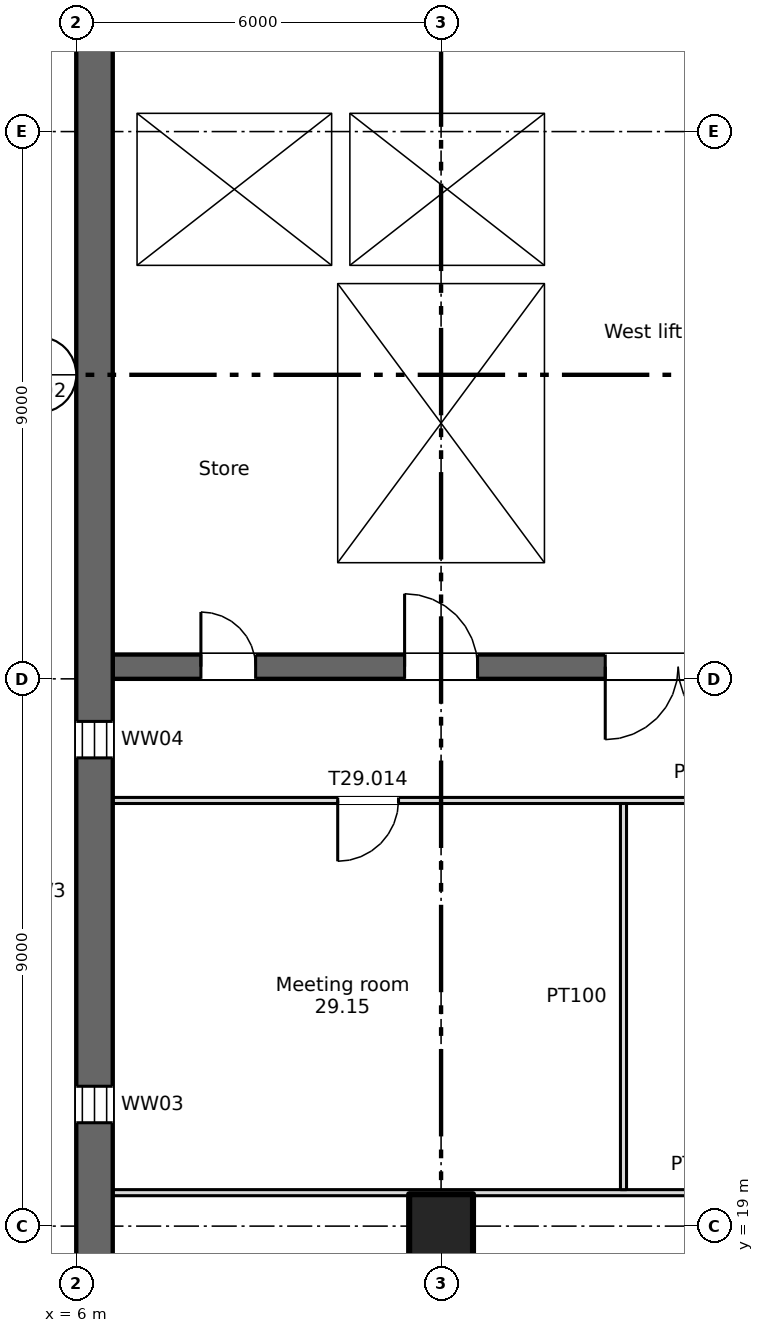
"""IFC4 building model, lengths in metres.
Left out: names, types, materials, properties, quantities, classifications, styles, units other than length and angle.
Written with IfcOpenShell. Run it as: python <this file> out.ifc"""

import sys

from ifc_helpers import new_model, si_unit, direction, frame, frame_2d, origin, origin_2d, place, context, subcontext, project, spatial, rectangle, extrude, element, fill, save


model = new_model("IFC4")
c1 = context("Model", 3, precision=1e-05, world=origin(), true_north=direction((0.0, 1.0)))
c2 = subcontext(c1, "Body", "Model", "MODEL_VIEW")
j1 = project(units=[si_unit("LENGTHUNIT", "METRE"), si_unit("PLANEANGLEUNIT", "RADIAN")], contexts=[c1])
p1 = place(None, origin())
s1 = spatial("IfcSite", under=j1, at=p1, CompositionType="ELEMENT")
p2 = place(p1, origin())
s2 = spatial("IfcBuilding", under=s1, at=p2, CompositionType="ELEMENT")
p3 = place(p2, frame((0.0, 0.0, 200.5)))
s3 = spatial("IfcBuildingStorey", under=s2, at=p3, CompositionType="ELEMENT", Elevation=200.5)
p4 = place(p3, frame((12.0, 19.0, 0.0), z_axis=(0.0, 0.0, 1.0), x_axis=(1.0, 0.0, 0.0)))
e1 = element("IfcColumn", 1, at=p4, inside=s3, PredefinedType="COLUMN", context=c2, shape_type="SweptSolid", body=[
    extrude(rectangle(XDim=1.05, YDim=1.05, at=origin_2d()), origin(), (0.0, 0.0, 1.0), 3.35),
])
p5 = place(p3, frame((6.3, 7.5, 0.0), z_axis=(0.0, 0.0, 1.0), x_axis=(0.0, 1.0, 0.0)))
e2 = element("IfcWall", 2, at=p5, inside=s3, PredefinedType="SHEAR", context=c2, shape_type="SweptSolid", body=[
    extrude(rectangle(XDim=34.0, YDim=0.6, at=frame_2d((17.0, 0.0))), origin(), (0.0, 0.0, 1.0), 3.35),
])
p6 = place(p5, frame((1.2, 0.0, 0.6)))
e3 = element("IfcOpeningElement", 3, at=p6, cuts=e2, PredefinedType="OPENING", context=c2, shape_type="SweptSolid", body=[
    extrude(rectangle(XDim=0.6, YDim=2.4, at=frame_2d((0.3, 1.2))), frame((0.0, 0.31, 0.0), z_axis=(0.0, -1.0, 0.0), x_axis=(1.0, 0.0, 0.0)), (0.0, 0.0, 1.0), 0.62),
])
p7 = place(p5, frame((7.2, 0.0, 0.6)))
e4 = element("IfcOpeningElement", 4, at=p7, cuts=e2, PredefinedType="OPENING", context=c2, shape_type="SweptSolid", body=[
    extrude(rectangle(XDim=0.6, YDim=2.4, at=frame_2d((0.3, 1.2))), frame((0.0, 0.31, 0.0), z_axis=(0.0, -1.0, 0.0), x_axis=(1.0, 0.0, 0.0)), (0.0, 0.0, 1.0), 0.62),
])
p8 = place(p5, frame((13.2, 0.0, 0.6)))
e5 = element("IfcOpeningElement", 5, at=p8, cuts=e2, PredefinedType="OPENING", context=c2, shape_type="SweptSolid", body=[
    extrude(rectangle(XDim=0.6, YDim=2.4, at=frame_2d((0.3, 1.2))), frame((0.0, 0.31, 0.0), z_axis=(0.0, -1.0, 0.0), x_axis=(1.0, 0.0, 0.0)), (0.0, 0.0, 1.0), 0.62),
])
p9 = place(p5, frame((19.2, 0.0, 0.6)))
e6 = element("IfcOpeningElement", 6, at=p9, cuts=e2, PredefinedType="OPENING", context=c2, shape_type="SweptSolid", body=[
    extrude(rectangle(XDim=0.6, YDim=2.4, at=frame_2d((0.3, 1.2))), frame((0.0, 0.31, 0.0), z_axis=(0.0, -1.0, 0.0), x_axis=(1.0, 0.0, 0.0)), (0.0, 0.0, 1.0), 0.62),
])
p10 = place(p3, frame((6.6, 28.2, 0.0), z_axis=(0.0, 0.0, 1.0), x_axis=(1.0, 0.0, 0.0)))
e7 = element("IfcWall", 7, at=p10, inside=s3, PredefinedType="SHEAR", context=c2, shape_type="SweptSolid", body=[
    extrude(rectangle(XDim=57.9, YDim=0.4, at=frame_2d((28.95, 0.0))), origin(), (0.0, 0.0, 1.0), 3.35),
])
p11 = place(p10, frame((13.95, 0.0, 0.0)))
e8 = element("IfcOpeningElement", 8, at=p11, cuts=e7, PredefinedType="OPENING", context=c2, shape_type="SweptSolid", body=[
    extrude(rectangle(XDim=0.9, YDim=2.1, at=frame_2d((0.45, 1.05))), frame((0.0, 0.21, 0.0), z_axis=(0.0, -1.0, 0.0), x_axis=(1.0, 0.0, 0.0)), (0.0, 0.0, 1.0), 0.42),
])
p12 = place(p10, frame((48.663, 0.0, 0.0)))
e9 = element("IfcOpeningElement", 9, at=p12, cuts=e7, PredefinedType="OPENING", context=c2, shape_type="SweptSolid", body=[
    extrude(rectangle(XDim=0.9, YDim=2.1, at=frame_2d((0.45, 1.05))), frame((0.0, 0.21, 0.0), z_axis=(0.0, -1.0, 0.0), x_axis=(1.0, 0.0, 0.0)), (0.0, 0.0, 1.0), 0.42),
])
p13 = place(p10, frame((51.238, 0.0, 0.0)))
e10 = element("IfcOpeningElement", 10, at=p13, cuts=e7, PredefinedType="OPENING", context=c2, shape_type="SweptSolid", body=[
    extrude(rectangle(XDim=0.9, YDim=2.1, at=frame_2d((0.45, 1.05))), frame((0.0, 0.21, 0.0), z_axis=(0.0, -1.0, 0.0), x_axis=(1.0, 0.0, 0.0)), (0.0, 0.0, 1.0), 0.42),
])
p14 = place(p10, frame((1.45, 0.0, 0.0)))
e11 = element("IfcOpeningElement", 11, at=p14, cuts=e7, PredefinedType="OPENING", context=c2, shape_type="SweptSolid", body=[
    extrude(rectangle(XDim=0.9, YDim=2.1, at=frame_2d((0.45, 1.05))), frame((0.0, 0.21, 0.0), z_axis=(0.0, -1.0, 0.0), x_axis=(1.0, 0.0, 0.0)), (0.0, 0.0, 1.0), 0.42),
])
p15 = place(p10, frame((4.8, 0.0, 0.0)))
e12 = element("IfcOpeningElement", 12, at=p15, cuts=e7, PredefinedType="OPENING", context=c2, shape_type="SweptSolid", body=[
    extrude(rectangle(XDim=1.2, YDim=2.1, at=frame_2d((0.6, 1.05))), frame((0.0, 0.21, 0.0), z_axis=(0.0, -1.0, 0.0), x_axis=(1.0, 0.0, 0.0)), (0.0, 0.0, 1.0), 0.42),
])
p16 = place(p10, frame((31.8, 0.0, 0.0)))
e13 = element("IfcOpeningElement", 13, at=p16, cuts=e7, PredefinedType="OPENING", context=c2, shape_type="SweptSolid", body=[
    extrude(rectangle(XDim=1.2, YDim=2.1, at=frame_2d((0.6, 1.05))), frame((0.0, 0.21, 0.0), z_axis=(0.0, -1.0, 0.0), x_axis=(1.0, 0.0, 0.0)), (0.0, 0.0, 1.0), 0.42),
])
p17 = place(p10, frame((55.3, 0.0, 0.0)))
e14 = element("IfcOpeningElement", 14, at=p17, cuts=e7, PredefinedType="OPENING", context=c2, shape_type="SweptSolid", body=[
    extrude(rectangle(XDim=1.2, YDim=2.1, at=frame_2d((0.6, 1.05))), frame((0.0, 0.21, 0.0), z_axis=(0.0, -1.0, 0.0), x_axis=(1.0, 0.0, 0.0)), (0.0, 0.0, 1.0), 0.42),
])
p18 = place(p10, frame((21.8, 0.0, 0.0)))
e15 = element("IfcOpeningElement", 15, at=p18, cuts=e7, PredefinedType="OPENING", context=c2, shape_type="SweptSolid", body=[
    extrude(rectangle(XDim=1.2, YDim=2.1, at=frame_2d((0.6, 1.05))), frame((0.0, 0.21, 0.0), z_axis=(0.0, -1.0, 0.0), x_axis=(1.0, 0.0, 0.0)), (0.0, 0.0, 1.0), 0.42),
])
p19 = place(p10, frame((41.8, 0.0, 0.0)))
e16 = element("IfcOpeningElement", 16, at=p19, cuts=e7, PredefinedType="OPENING", context=c2, shape_type="SweptSolid", body=[
    extrude(rectangle(XDim=1.2, YDim=2.1, at=frame_2d((0.6, 1.05))), frame((0.0, 0.21, 0.0), z_axis=(0.0, -1.0, 0.0), x_axis=(1.0, 0.0, 0.0)), (0.0, 0.0, 1.0), 0.42),
])
p20 = place(p10, frame((24.95, 0.0, 0.0)))
e17 = element("IfcOpeningElement", 17, at=p20, cuts=e7, PredefinedType="OPENING", context=c2, shape_type="SweptSolid", body=[
    extrude(rectangle(XDim=2.4, YDim=2.1, at=frame_2d((1.2, 1.05))), frame((0.0, 0.21, 0.0), z_axis=(0.0, -1.0, 0.0), x_axis=(1.0, 0.0, 0.0)), (0.0, 0.0, 1.0), 0.42),
])
p21 = place(p10, frame((37.45, 0.0, 0.0)))
e18 = element("IfcOpeningElement", 18, at=p21, cuts=e7, PredefinedType="OPENING", context=c2, shape_type="SweptSolid", body=[
    extrude(rectangle(XDim=2.4, YDim=2.1, at=frame_2d((1.2, 1.05))), frame((0.0, 0.21, 0.0), z_axis=(0.0, -1.0, 0.0), x_axis=(1.0, 0.0, 0.0)), (0.0, 0.0, 1.0), 0.42),
])
p22 = place(p10, frame((8.1, 0.0, 0.0)))
e19 = element("IfcOpeningElement", 19, at=p22, cuts=e7, PredefinedType="OPENING", context=c2, shape_type="SweptSolid", body=[
    extrude(rectangle(XDim=2.4, YDim=2.1, at=frame_2d((1.2, 1.05))), frame((0.0, 0.21, 0.0), z_axis=(0.0, -1.0, 0.0), x_axis=(1.0, 0.0, 0.0)), (0.0, 0.0, 1.0), 0.42),
])
p23 = place(p10, frame((28.95, 0.0, 0.0)))
e20 = element("IfcOpeningElement", 20, at=p23, cuts=e7, PredefinedType="OPENING", context=c2, shape_type="SweptSolid", body=[
    extrude(rectangle(XDim=0.9, YDim=2.1, at=frame_2d((0.45, 1.05))), frame((0.0, 0.21, 0.0), z_axis=(0.0, -1.0, 0.0), x_axis=(1.0, 0.0, 0.0)), (0.0, 0.0, 1.0), 0.42),
])
p24 = place(p10, frame((34.95, 0.0, 0.0)))
e21 = element("IfcOpeningElement", 21, at=p24, cuts=e7, PredefinedType="OPENING", context=c2, shape_type="SweptSolid", body=[
    extrude(rectangle(XDim=0.9, YDim=2.1, at=frame_2d((0.45, 1.05))), frame((0.0, 0.21, 0.0), z_axis=(0.0, -1.0, 0.0), x_axis=(1.0, 0.0, 0.0)), (0.0, 0.0, 1.0), 0.42),
])
p25 = place(p3, frame((6.8, 28.4, 0.0), z_axis=(0.0, 0.0, 1.0), x_axis=(0.0, 1.0, 0.0)))
e22 = element("IfcWall", 22, at=p25, inside=s3, PredefinedType="SHEAR", context=c2, shape_type="SweptSolid", body=[
    extrude(rectangle(XDim=12.85, YDim=0.4, at=frame_2d((6.425, 0.0))), origin(), (0.0, 0.0, 1.0), 3.35),
])
for number, where, z_axis, x_axis in (
    (23, (10.15, 28.4, 0.0), (0.0, 0.0, 1.0), (0.0, 1.0, 0.0)),
    (24, (13.85, 28.4, 0.0), (0.0, 0.0, 1.0), (0.0, 1.0, 0.0)),
):
    element("IfcWall", number, at=place(p3, frame(where, z_axis=z_axis, x_axis=x_axis)), inside=s3, PredefinedType="SHEAR", context=c2, shape_type="SweptSolid", body=[
        extrude(rectangle(XDim=6.1, YDim=0.3, at=frame_2d((3.05, 0.0))), origin(), (0.0, 0.0, 1.0), 3.35),
    ])
for number, where, z_axis, x_axis in (
    (25, (7.0, 34.65, 0.0), (0.0, 0.0, 1.0), (1.0, 0.0, 0.0)),
    (26, (7.0, 37.45, 0.0), (0.0, 0.0, 1.0), (1.0, 0.0, 0.0)),
):
    element("IfcWall", number, at=place(p3, frame(where, z_axis=z_axis, x_axis=x_axis)), inside=s3, PredefinedType="SHEAR", context=c2, shape_type="SweptSolid", body=[
        extrude(rectangle(XDim=7.0, YDim=0.3, at=frame_2d((3.5, 0.0))), origin(), (0.0, 0.0, 1.0), 3.35),
    ])
for number, where, z_axis, x_axis in (
    (27, (13.85, 34.8, 0.0), (0.0, 0.0, 1.0), (0.0, 1.0, 0.0)),
    (28, (10.35, 34.8, 0.0), (0.0, 0.0, 1.0), (0.0, 1.0, 0.0)),
):
    element("IfcWall", number, at=place(p3, frame(where, z_axis=z_axis, x_axis=x_axis)), inside=s3, PredefinedType="SHEAR", context=c2, shape_type="SweptSolid", body=[
        extrude(rectangle(XDim=2.5, YDim=0.3, at=frame_2d((1.25, 0.0))), origin(), (0.0, 0.0, 1.0), 3.35),
    ])
p26 = place(p3, frame((6.6, 19.55, 0.0), z_axis=(0.0, 0.0, 1.0), x_axis=(1.0, 0.0, 0.0)))
e29 = element("IfcWall", 29, at=p26, inside=s3, PredefinedType="PARTITIONING", context=c2, shape_type="SweptSolid", body=[
    extrude(rectangle(XDim=19.35, YDim=0.1, at=frame_2d((9.675, 0.0))), origin(), (0.0, 0.0, 1.0), 3.35),
])
p27 = place(p3, frame((6.6, 26.0, 0.0), z_axis=(0.0, 0.0, 1.0), x_axis=(1.0, 0.0, 0.0)))
e30 = element("IfcWall", 30, at=p27, inside=s3, PredefinedType="PARTITIONING", context=c2, shape_type="SweptSolid", body=[
    extrude(rectangle(XDim=19.45, YDim=0.1, at=frame_2d((9.725, 0.0))), origin(), (0.0, 0.0, 1.0), 3.35),
])
p28 = place(p27, frame((3.7, 0.0, 0.0)))
e31 = element("IfcOpeningElement", 31, at=p28, cuts=e30, PredefinedType="OPENING", context=c2, shape_type="SweptSolid", body=[
    extrude(rectangle(XDim=1.0, YDim=2.1, at=frame_2d((0.5, 1.05))), frame((0.0, 0.06, 0.0), z_axis=(0.0, -1.0, 0.0), x_axis=(1.0, 0.0, 0.0)), (0.0, 0.0, 1.0), 0.12),
])
p29 = place(p27, frame((13.0, 0.0, 0.0)))
e32 = element("IfcOpeningElement", 32, at=p29, cuts=e30, PredefinedType="OPENING", context=c2, shape_type="SweptSolid", body=[
    extrude(rectangle(XDim=1.8, YDim=2.1, at=frame_2d((0.9, 1.05))), frame((0.0, 0.06, 0.0), z_axis=(0.0, -1.0, 0.0), x_axis=(1.0, 0.0, 0.0)), (0.0, 0.0, 1.0), 0.12),
])
p30 = place(p3, frame((15.0, 19.6, 0.0), z_axis=(0.0, 0.0, 1.0), x_axis=(0.0, 1.0, 0.0)))
e33 = element("IfcWall", 33, at=p30, inside=s3, PredefinedType="PARTITIONING", context=c2, shape_type="SweptSolid", body=[
    extrude(rectangle(XDim=6.35, YDim=0.1, at=frame_2d((3.175, 0.0))), origin(), (0.0, 0.0, 1.0), 3.35),
])
p31 = place(p8, origin())
e34 = element("IfcWindow", 34, at=p31, inside=s3, PartitioningType="SINGLE_PANEL", PredefinedType="WINDOW", context=c2, shape_type="SweptSolid", body=[
    extrude(rectangle(XDim=0.6, YDim=2.4, at=frame_2d((0.3, 1.2))), frame((0.0, 0.03, 0.0), z_axis=(0.0, -1.0, 0.0), x_axis=(1.0, 0.0, 0.0)), (0.0, 0.0, 1.0), 0.06),
])
fill(e5, e34)
p32 = place(p9, origin())
e35 = element("IfcWindow", 35, at=p32, inside=s3, PartitioningType="SINGLE_PANEL", PredefinedType="WINDOW", context=c2, shape_type="SweptSolid", body=[
    extrude(rectangle(XDim=0.6, YDim=2.4, at=frame_2d((0.3, 1.2))), frame((0.0, 0.03, 0.0), z_axis=(0.0, -1.0, 0.0), x_axis=(1.0, 0.0, 0.0)), (0.0, 0.0, 1.0), 0.06),
])
fill(e6, e35)
p33 = place(p14, origin())
e36 = element("IfcDoor", 36, at=p33, inside=s3, OperationType="SINGLE_SWING_LEFT", PredefinedType="DOOR", context=c2, shape_type="SweptSolid", body=[
    extrude(rectangle(XDim=0.9, YDim=2.1, at=frame_2d((0.45, 1.05))), frame((0.0, 0.025, 0.0), z_axis=(0.0, -1.0, 0.0), x_axis=(1.0, 0.0, 0.0)), (0.0, 0.0, 1.0), 0.05),
])
fill(e11, e36)
p34 = place(p15, origin())
e37 = element("IfcDoor", 37, at=p34, inside=s3, OperationType="SINGLE_SWING_LEFT", PredefinedType="DOOR", context=c2, shape_type="SweptSolid", body=[
    extrude(rectangle(XDim=1.2, YDim=2.1, at=frame_2d((0.6, 1.05))), frame((0.0, 0.025, 0.0), z_axis=(0.0, -1.0, 0.0), x_axis=(1.0, 0.0, 0.0)), (0.0, 0.0, 1.0), 0.05),
])
fill(e12, e37)
p35 = place(p22, origin())
e38 = element("IfcDoor", 38, at=p35, inside=s3, OperationType="DOUBLE_DOOR_SINGLE_SWING", PredefinedType="DOOR", context=c2, shape_type="SweptSolid", body=[
    extrude(rectangle(XDim=2.4, YDim=2.1, at=frame_2d((1.2, 1.05))), frame((0.0, 0.025, 0.0), z_axis=(0.0, -1.0, 0.0), x_axis=(1.0, 0.0, 0.0)), (0.0, 0.0, 1.0), 0.05),
])
fill(e19, e38)
p36 = place(p28, origin())
e39 = element("IfcDoor", 39, at=p36, inside=s3, OperationType="SINGLE_SWING_LEFT", PredefinedType="DOOR", context=c2, shape_type="SweptSolid", body=[
    extrude(rectangle(XDim=1.0, YDim=2.1, at=frame_2d((0.5, 1.05))), frame((0.0, 0.025, 0.0), z_axis=(0.0, -1.0, 0.0), x_axis=(1.0, 0.0, 0.0)), (0.0, 0.0, 1.0), 0.05),
])
fill(e31, e39)
save(model, sys.argv[1])
